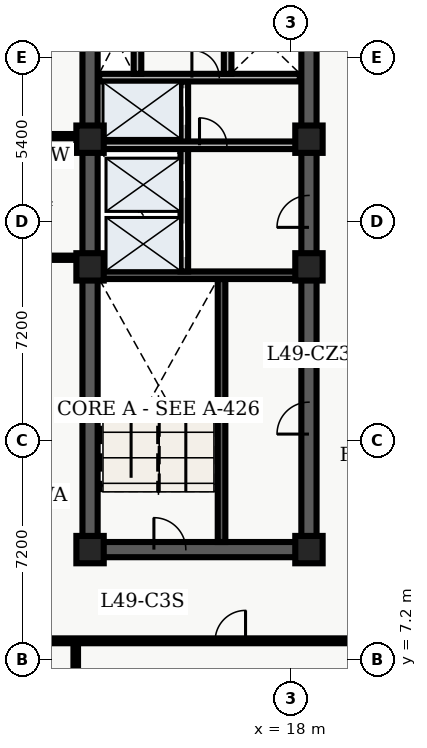
"""IFC4 building model, lengths in metres.
Left out: names, types, materials, properties, quantities, classifications, styles, units other than length and angle.
Written with IfcOpenShell. Run it as: python <this file> out.ifc"""

import sys

from ifc_helpers import new_model, entity, si_unit, converted_unit, direction, frame, origin_with_axes, origin_2d_with_axis, place, context, subcontext, project, spatial, polyline, rectangle, outline, extrude, element, fill, save


model = new_model("IFC4")
c1 = context("Model", 3, precision=1e-05, world=origin_with_axes(), true_north=direction((0.0, 1.0)))
c2 = subcontext(c1, "Body", "Model", "MODEL_VIEW")
j1 = project(units=[si_unit("LENGTHUNIT", "METRE"), converted_unit("PLANEANGLEUNIT", "DEGREE", entity("IfcPlaneAngleMeasure", 0.017), si_unit("PLANEANGLEUNIT", "RADIAN"), dimensions=[0, 0, 0, 0, 0, 0, 0])], contexts=[c1])
p1 = place(None, origin_with_axes())
s1 = spatial("IfcSite", under=j1, at=p1, CompositionType="ELEMENT")
p2 = place(p1, origin_with_axes())
s2 = spatial("IfcBuilding", under=s1, at=p2, CompositionType="ELEMENT")
p3 = place(p2, frame((0.0, 0.0, 200.4), z_axis=(0.0, 0.0, 1.0), x_axis=(1.0, 0.0, 0.0)))
s3 = spatial("IfcBuildingStorey", under=s2, at=p3, CompositionType="ELEMENT", Elevation=200.4)
p4 = place(p3, frame((11.4, 10.8, 0.0), z_axis=(0.0, 0.0, 1.0), x_axis=(0.0, 1.0, 0.0)))
e1 = element("IfcWall", 1, at=p4, inside=s3, PredefinedType="SHEAR", context=c2, shape_type="SweptSolid", body=[
    extrude(outline(polyline([(0.0, -0.25), (27.0, -0.25), (27.0, 0.25), (0.0, 0.25), (0.0, -0.25)])), origin_with_axes(), (0.0, 0.0, 1.0), 3.66),
])
p5 = place(p3, frame((11.4, 10.8, 0.0), z_axis=(0.0, 0.0, 1.0), x_axis=(1.0, 0.0, 0.0)))
e2 = element("IfcWall", 2, at=p5, inside=s3, PredefinedType="SHEAR", context=c2, shape_type="SweptSolid", body=[
    extrude(outline(polyline([(0.0, -0.25), (7.2, -0.25), (7.2, 0.25), (0.0, 0.25), (0.0, -0.25)])), origin_with_axes(), (0.0, 0.0, 1.0), 3.66),
])
p6 = place(p5, frame((2.625, 0.0, 0.0), z_axis=(0.0, 0.0, 1.0), x_axis=(1.0, 0.0, 0.0)))
e3 = element("IfcOpeningElement", 3, at=p6, cuts=e2, PredefinedType="OPENING", context=c2, shape_type="SweptSolid", body=[
    extrude(rectangle(XDim=1.05, YDim=0.52, at=origin_2d_with_axis()), origin_with_axes(), (0.0, 0.0, 1.0), 2.15),
])
p7 = place(p3, frame((18.6, 10.8, 0.0), z_axis=(0.0, 0.0, 1.0), x_axis=(0.0, 1.0, 0.0)))
e4 = element("IfcWall", 4, at=p7, inside=s3, PredefinedType="SHEAR", context=c2, shape_type="SweptSolid", body=[
    extrude(outline(polyline([(0.0, -0.25), (13.5, -0.25), (13.5, 0.25), (0.0, 0.25), (0.0, -0.25)])), origin_with_axes(), (0.0, 0.0, 1.0), 3.66),
])
p8 = place(p7, frame((11.125, 0.0, 0.0), z_axis=(0.0, 0.0, 1.0), x_axis=(1.0, 0.0, 0.0)))
e5 = element("IfcOpeningElement", 5, at=p8, cuts=e4, PredefinedType="OPENING", context=c2, shape_type="SweptSolid", body=[
    extrude(rectangle(XDim=1.05, YDim=0.52, at=origin_2d_with_axis()), origin_with_axes(), (0.0, 0.0, 1.0), 2.15),
])
p9 = place(p7, frame((4.325, 0.0, 0.0), z_axis=(0.0, 0.0, 1.0), x_axis=(1.0, 0.0, 0.0)))
e6 = element("IfcOpeningElement", 6, at=p9, cuts=e4, PredefinedType="OPENING", context=c2, shape_type="SweptSolid", body=[
    extrude(rectangle(XDim=1.05, YDim=0.52, at=origin_2d_with_axis()), origin_with_axes(), (0.0, 0.0, 1.0), 2.15),
])
p10 = place(p3, frame((18.6, 24.3, 0.0), z_axis=(0.0, 0.0, 1.0), x_axis=(0.0, 1.0, 0.0)))
e7 = element("IfcWall", 7, at=p10, inside=s3, PredefinedType="SHEAR", context=c2, shape_type="SweptSolid", body=[
    extrude(outline(polyline([(0.0, -0.25), (13.5, -0.25), (13.5, 0.25), (0.0, 0.25), (0.0, -0.25)])), origin_with_axes(), (0.0, 0.0, 1.0), 3.66),
])
p11 = place(p10, frame((5.65, 0.0, 0.0), z_axis=(0.0, 0.0, 1.0), x_axis=(1.0, 0.0, 0.0)))
e8 = element("IfcOpeningElement", 8, at=p11, cuts=e7, PredefinedType="OPENING", context=c2, shape_type="SweptSolid", body=[
    extrude(rectangle(XDim=1.1, YDim=0.52, at=origin_2d_with_axis()), origin_with_axes(), (0.0, 0.0, 1.0), 2.15),
])
p12 = place(p10, frame((7.75, 0.0, 0.0), z_axis=(0.0, 0.0, 1.0), x_axis=(1.0, 0.0, 0.0)))
e9 = element("IfcOpeningElement", 9, at=p12, cuts=e7, PredefinedType="OPENING", context=c2, shape_type="SweptSolid", body=[
    extrude(rectangle(XDim=1.1, YDim=0.52, at=origin_2d_with_axis()), origin_with_axes(), (0.0, 0.0, 1.0), 2.15),
])
p13 = place(p3, frame((15.725, 11.05, 0.0), z_axis=(0.0, 0.0, 1.0), x_axis=(0.0, 1.0, 0.0)))
e10 = element("IfcWall", 10, at=p13, inside=s3, PredefinedType="SHEAR", context=c2, shape_type="SweptSolid", body=[
    extrude(outline(polyline([(0.0, -0.125), (8.65, -0.125), (8.65, 0.125), (0.0, 0.125), (0.0, -0.125)])), origin_with_axes(), (0.0, 0.0, 1.0), 3.66),
])
p14 = place(p3, frame((11.65, 19.825, 0.0), z_axis=(0.0, 0.0, 1.0), x_axis=(1.0, 0.0, 0.0)))
e11 = element("IfcWall", 11, at=p14, inside=s3, PredefinedType="SHEAR", context=c2, shape_type="SweptSolid", body=[
    extrude(outline(polyline([(0.0, -0.125), (6.7, -0.125), (6.7, 0.125), (0.0, 0.125), (0.0, -0.125)])), origin_with_axes(), (0.0, 0.0, 1.0), 3.66),
])
p15 = place(p3, frame((14.5, 19.95, 0.0), z_axis=(0.0, 0.0, 1.0), x_axis=(0.0, 1.0, 0.0)))
e12 = element("IfcWall", 12, at=p15, inside=s3, PredefinedType="SOLIDWALL", context=c2, shape_type="SweptSolid", body=[
    extrude(outline(polyline([(0.0, -0.125), (6.25, -0.125), (6.25, 0.125), (0.0, 0.125), (0.0, -0.125)])), origin_with_axes(), (0.0, 0.0, 1.0), 2.7),
])
p16 = place(p15, frame((1.025, 0.0, 0.0), z_axis=(0.0, 0.0, 1.0), x_axis=(1.0, 0.0, 0.0)))
e13 = element("IfcOpeningElement", 13, at=p16, cuts=e12, PredefinedType="OPENING", context=c2, shape_type="SweptSolid", body=[
    extrude(rectangle(XDim=1.1, YDim=0.27, at=origin_2d_with_axis()), origin_with_axes(), (0.0, 0.0, 1.0), 2.15),
])
p17 = place(p15, frame((2.975, 0.0, 0.0), z_axis=(0.0, 0.0, 1.0), x_axis=(1.0, 0.0, 0.0)))
e14 = element("IfcOpeningElement", 14, at=p17, cuts=e12, PredefinedType="OPENING", context=c2, shape_type="SweptSolid", body=[
    extrude(rectangle(XDim=1.1, YDim=0.27, at=origin_2d_with_axis()), origin_with_axes(), (0.0, 0.0, 1.0), 2.15),
])
p18 = place(p15, frame((5.425, 0.0, 0.0), z_axis=(0.0, 0.0, 1.0), x_axis=(1.0, 0.0, 0.0)))
e15 = element("IfcOpeningElement", 15, at=p18, cuts=e12, PredefinedType="OPENING", context=c2, shape_type="SweptSolid", body=[
    extrude(rectangle(XDim=1.2, YDim=0.27, at=origin_2d_with_axis()), origin_with_axes(), (0.0, 0.0, 1.0), 2.15),
])
p19 = place(p3, frame((11.7, 24.1, 0.0), z_axis=(0.0, 0.0, 1.0), x_axis=(1.0, 0.0, 0.0)))
e16 = element("IfcWall", 16, at=p19, inside=s3, PredefinedType="SOLIDWALL", context=c2, shape_type="SweptSolid", body=[
    extrude(outline(polyline([(0.0, -0.125), (6.6, -0.125), (6.6, 0.125), (0.0, 0.125), (0.0, -0.125)])), origin_with_axes(), (0.0, 0.0, 1.0), 2.7),
])
p20 = place(p19, frame((3.75, 0.0, 0.0), z_axis=(0.0, 0.0, 1.0), x_axis=(1.0, 0.0, 0.0)))
e17 = element("IfcOpeningElement", 17, at=p20, cuts=e16, PredefinedType="OPENING", context=c2, shape_type="SweptSolid", body=[
    extrude(rectangle(XDim=0.9, YDim=0.27, at=origin_2d_with_axis()), origin_with_axes(), (0.0, 0.0, 1.0), 2.15),
])
p21 = place(p3, frame((11.7, 26.325, 0.0), z_axis=(0.0, 0.0, 1.0), x_axis=(1.0, 0.0, 0.0)))
e18 = element("IfcWall", 18, at=p21, inside=s3, PredefinedType="SOLIDWALL", context=c2, shape_type="SweptSolid", body=[
    extrude(outline(polyline([(0.0, -0.125), (6.6, -0.125), (6.6, 0.125), (0.0, 0.125), (0.0, -0.125)])), origin_with_axes(), (0.0, 0.0, 1.0), 2.7),
])
p22 = place(p21, frame((3.5, 0.0, 0.0), z_axis=(0.0, 0.0, 1.0), x_axis=(1.0, 0.0, 0.0)))
e19 = element("IfcOpeningElement", 19, at=p22, cuts=e18, PredefinedType="OPENING", context=c2, shape_type="SweptSolid", body=[
    extrude(rectangle(XDim=0.9, YDim=0.27, at=origin_2d_with_axis()), origin_with_axes(), (0.0, 0.0, 1.0), 2.15),
])
for number, where, z_axis, x_axis in (
    (20, (12.96, 26.45, 0.0), (0.0, 0.0, 1.0), (0.0, 1.0, 0.0)),
    (21, (15.925, 26.45, 0.0), (0.0, 0.0, 1.0), (0.0, 1.0, 0.0)),
):
    element("IfcWall", number, at=place(p3, frame(where, z_axis=z_axis, x_axis=x_axis)), inside=s3, PredefinedType="SOLIDWALL", context=c2, shape_type="SweptSolid", body=[
        extrude(outline(polyline([(0.0, -0.125), (2.2, -0.125), (2.2, 0.125), (0.0, 0.125), (0.0, -0.125)])), origin_with_axes(), (0.0, 0.0, 1.0), 2.7),
    ])
for number, where, z_axis, x_axis in (
    (22, (11.4, 10.8, 0.0), (0.0, 0.0, 1.0), (1.0, 0.0, 0.0)),
    (23, (11.4, 20.1, 0.0), (0.0, 0.0, 1.0), (1.0, 0.0, 0.0)),
    (24, (11.4, 24.3, 0.0), (0.0, 0.0, 1.0), (1.0, 0.0, 0.0)),
    (25, (18.6, 10.8, 0.0), (0.0, 0.0, 1.0), (1.0, 0.0, 0.0)),
    (26, (18.6, 20.1, 0.0), (0.0, 0.0, 1.0), (1.0, 0.0, 0.0)),
    (27, (18.6, 24.3, 0.0), (0.0, 0.0, 1.0), (1.0, 0.0, 0.0)),
):
    element("IfcColumn", number, at=place(p3, frame(where, z_axis=z_axis, x_axis=x_axis)), inside=s3, PredefinedType="COLUMN", context=c2, shape_type="SweptSolid", body=[
        extrude(rectangle(XDim=0.9, YDim=0.9, at=origin_2d_with_axis()), origin_with_axes(), (0.0, 0.0, 1.0), 3.9),
    ])
for number, where, z_axis, x_axis in (
    (28, (9.52, 20.4, 0.0), (0.0, 0.0, 1.0), (1.0, 0.0, 0.0)),
    (29, (9.52, 24.4, 0.0), (0.0, 0.0, 1.0), (1.0, 0.0, 0.0)),
):
    element("IfcWall", number, at=place(p3, frame(where, z_axis=z_axis, x_axis=x_axis)), inside=s3, PredefinedType="PARTITIONING", context=c2, shape_type="SweptSolid", body=[
        extrude(outline(polyline([(0.0, -0.07), (1.58, -0.07), (1.58, 0.07), (0.0, 0.07), (0.0, -0.07)])), origin_with_axes(), (0.0, 0.0, 1.0), 2.7),
    ])
p23 = place(p3, frame((2.6, 7.8, 0.0), z_axis=(0.0, 0.0, 1.0), x_axis=(1.0, 0.0, 0.0)))
e30 = element("IfcWall", 30, at=p23, inside=s3, PredefinedType="PARTITIONING", context=c2, shape_type="SweptSolid", body=[
    extrude(outline(polyline([(0.0, -0.08), (18.55, -0.08), (18.55, 0.08), (0.0, 0.08), (0.0, -0.08)])), origin_with_axes(), (0.0, 0.0, 1.0), 2.7),
])
p24 = place(p23, frame((5.04, 0.0, 0.0), z_axis=(0.0, 0.0, 1.0), x_axis=(1.0, 0.0, 0.0)))
e31 = element("IfcOpeningElement", 31, at=p24, cuts=e30, PredefinedType="OPENING", context=c2, shape_type="SweptSolid", body=[
    extrude(rectangle(XDim=1.2, YDim=0.18, at=origin_2d_with_axis()), origin_with_axes(), (0.0, 0.0, 1.0), 2.2),
])
p25 = place(p23, frame((13.415, 0.0, 0.0), z_axis=(0.0, 0.0, 1.0), x_axis=(1.0, 0.0, 0.0)))
e32 = element("IfcOpeningElement", 32, at=p25, cuts=e30, PredefinedType="OPENING", context=c2, shape_type="SweptSolid", body=[
    extrude(rectangle(XDim=1.0, YDim=0.18, at=origin_2d_with_axis()), origin_with_axes(), (0.0, 0.0, 1.0), 2.15),
])
p26 = place(p3, frame((10.929, 0.335, 0.0), z_axis=(0.0, 0.0, 1.0), x_axis=(0.0, 1.0, 0.0)))
e33 = element("IfcWall", 33, at=p26, inside=s3, PredefinedType="PARTITIONING", context=c2, shape_type="SweptSolid", body=[
    extrude(outline(polyline([(0.0, -0.075), (7.365, -0.075), (7.365, 0.075), (0.0, 0.075), (0.0, -0.075)])), origin_with_axes(), (0.0, 0.0, 1.0), 2.7),
])
p27 = place(p15, frame((1.025, 0.0, 0.0), z_axis=(0.0, 0.0, 1.0), x_axis=(1.0, 0.0, 0.0)))
e34 = element("IfcDoor", 34, at=p27, inside=s3, OperationType="SLIDING_TO_LEFT", PredefinedType="DOOR", context=c2, shape_type="SweptSolid", body=[
    extrude(rectangle(XDim=1.1, YDim=0.09, at=origin_2d_with_axis()), origin_with_axes(), (0.0, 0.0, 1.0), 2.15),
])
fill(e13, e34)
p28 = place(p15, frame((2.975, 0.0, 0.0), z_axis=(0.0, 0.0, 1.0), x_axis=(1.0, 0.0, 0.0)))
e35 = element("IfcDoor", 35, at=p28, inside=s3, OperationType="SLIDING_TO_RIGHT", PredefinedType="DOOR", context=c2, shape_type="SweptSolid", body=[
    extrude(rectangle(XDim=1.1, YDim=0.09, at=origin_2d_with_axis()), origin_with_axes(), (0.0, 0.0, 1.0), 2.15),
])
fill(e14, e35)
p29 = place(p15, frame((5.425, 0.0, 0.0), z_axis=(0.0, 0.0, 1.0), x_axis=(1.0, 0.0, 0.0)))
e36 = element("IfcDoor", 36, at=p29, inside=s3, OperationType="DOUBLE_DOOR_SLIDING", PredefinedType="DOOR", context=c2, shape_type="SweptSolid", body=[
    extrude(rectangle(XDim=1.2, YDim=0.09, at=origin_2d_with_axis()), origin_with_axes(), (0.0, 0.0, 1.0), 2.15),
])
fill(e15, e36)
p30 = place(p5, frame((2.625, 0.0, 0.0), z_axis=(0.0, 0.0, 1.0), x_axis=(1.0, 0.0, 0.0)))
e37 = element("IfcDoor", 37, at=p30, inside=s3, OperationType="SINGLE_SWING_LEFT", PredefinedType="DOOR", context=c2, shape_type="SweptSolid", body=[
    extrude(rectangle(XDim=1.05, YDim=0.09, at=origin_2d_with_axis()), origin_with_axes(), (0.0, 0.0, 1.0), 2.15),
])
fill(e3, e37)
p31 = place(p7, frame((11.125, 0.0, 0.0), z_axis=(0.0, 0.0, 1.0), x_axis=(1.0, 0.0, 0.0)))
e38 = element("IfcDoor", 38, at=p31, inside=s3, OperationType="SINGLE_SWING_LEFT", PredefinedType="DOOR", context=c2, shape_type="SweptSolid", body=[
    extrude(rectangle(XDim=1.05, YDim=0.09, at=origin_2d_with_axis()), origin_with_axes(), (0.0, 0.0, 1.0), 2.15),
])
fill(e5, e38)
p32 = place(p19, frame((3.75, 0.0, 0.0), z_axis=(0.0, 0.0, 1.0), x_axis=(1.0, 0.0, 0.0)))
e39 = element("IfcDoor", 39, at=p32, inside=s3, OperationType="SINGLE_SWING_LEFT", PredefinedType="DOOR", context=c2, shape_type="SweptSolid", body=[
    extrude(rectangle(XDim=0.9, YDim=0.09, at=origin_2d_with_axis()), origin_with_axes(), (0.0, 0.0, 1.0), 2.15),
])
fill(e17, e39)
p33 = place(p21, frame((3.5, 0.0, 0.0), z_axis=(0.0, 0.0, 1.0), x_axis=(1.0, 0.0, 0.0)))
e40 = element("IfcDoor", 40, at=p33, inside=s3, OperationType="SINGLE_SWING_LEFT", PredefinedType="DOOR", context=c2, shape_type="SweptSolid", body=[
    extrude(rectangle(XDim=0.9, YDim=0.09, at=origin_2d_with_axis()), origin_with_axes(), (0.0, 0.0, 1.0), 2.15),
])
fill(e19, e40)
p34 = place(p7, frame((4.325, 0.0, 0.0), z_axis=(0.0, 0.0, 1.0), x_axis=(1.0, 0.0, 0.0)))
e41 = element("IfcDoor", 41, at=p34, inside=s3, OperationType="SINGLE_SWING_LEFT", PredefinedType="DOOR", context=c2, shape_type="SweptSolid", body=[
    extrude(rectangle(XDim=1.05, YDim=0.09, at=origin_2d_with_axis()), origin_with_axes(), (0.0, 0.0, 1.0), 2.15),
])
fill(e6, e41)
p35 = place(p23, frame((13.415, 0.0, 0.0), z_axis=(0.0, 0.0, 1.0), x_axis=(1.0, 0.0, 0.0)))
e42 = element("IfcDoor", 42, at=p35, inside=s3, OperationType="SINGLE_SWING_RIGHT", PredefinedType="DOOR", context=c2, shape_type="SweptSolid", body=[
    extrude(rectangle(XDim=1.0, YDim=0.09, at=origin_2d_with_axis()), origin_with_axes(), (0.0, 0.0, 1.0), 2.15),
])
fill(e32, e42)
save(model, sys.argv[1])
